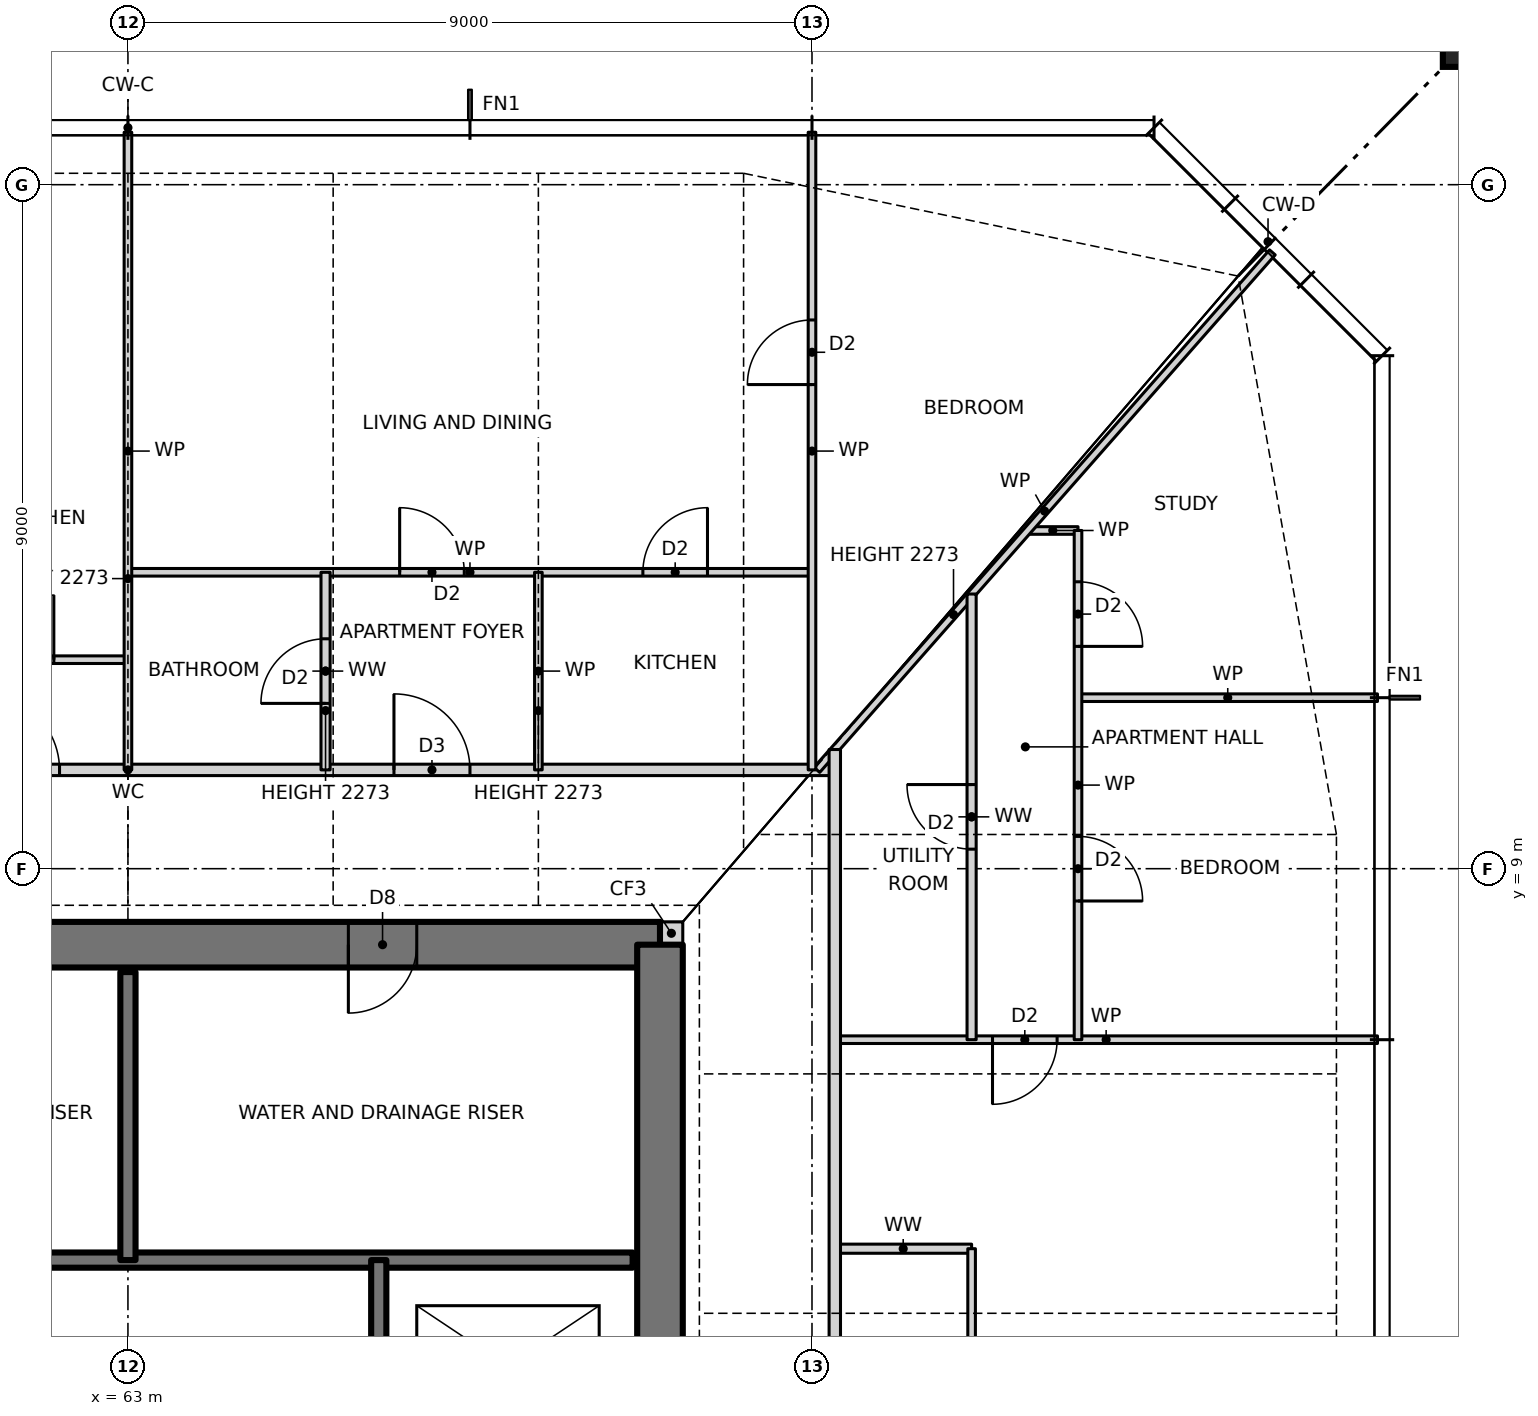
"""IFC4 building model, lengths in metres.
Left out: names, types, materials, properties, quantities, classifications, styles, units other than length and angle.
Written with IfcOpenShell. Run it as: python <this file> out.ifc"""

import sys

from ifc_helpers import new_model, si_unit, direction, frame, frame_2d, origin, origin_2d, place, context, subcontext, project, spatial, rectangle, hollow_rectangle, extrude, element, fill, save


model = new_model("IFC4")
c1 = context("Model", 3, precision=1e-05, world=origin(), true_north=direction((0.0, 1.0)))
c2 = subcontext(c1, "Body", "Model", "MODEL_VIEW")
j1 = project(units=[si_unit("LENGTHUNIT", "METRE"), si_unit("PLANEANGLEUNIT", "RADIAN")], contexts=[c1])
p1 = place(None, origin())
s1 = spatial("IfcSite", under=j1, at=p1, CompositionType="ELEMENT")
p2 = place(p1, origin())
s2 = spatial("IfcBuilding", under=s1, at=p2, CompositionType="ELEMENT")
p3 = place(p2, frame((0.0, 0.0, 71.0)))
s3 = spatial("IfcBuildingStorey", under=s2, at=p3, CompositionType="ELEMENT", Elevation=71.0)
p4 = place(p3, frame((80.9, 20.15, 0.0), z_axis=(0.0, 0.0, 1.0), x_axis=(1.0, 0.0, 0.0)))
e1 = element("IfcColumn", 1, at=p4, inside=s3, PredefinedType="COLUMN", context=c2, shape_type="SweptSolid", body=[
    extrude(hollow_rectangle(XDim=1.2, YDim=1.2, WallThickness=0.07, at=origin_2d()), origin(), (0.0, 0.0, 1.0), 3.5),
])
p5 = place(p3, frame((70.0, 8.15, 0.0), z_axis=(0.0, 0.0, 1.0), x_axis=(1.0, 0.0, 0.0)))
e2 = element("IfcWall", 2, at=p5, inside=s3, PredefinedType="SOLIDWALL", context=c2, shape_type="SweptSolid", body=[
    extrude(rectangle(XDim=0.3, YDim=0.3, at=frame_2d((0.15, 0.0))), origin(), (0.0, 0.0, 1.0), 3.5),
])
p6 = place(p3, frame((70.0, 8.0, 0.0), z_axis=(0.0, 0.0, 1.0), x_axis=(-1.0, 0.0, 0.0)))
e3 = element("IfcWall", 3, at=p6, inside=s3, PredefinedType="SHEAR", context=c2, shape_type="SweptSolid", body=[
    extrude(rectangle(XDim=14.0, YDim=0.6, at=frame_2d((7.0, 0.0))), origin(), (0.0, 0.0, 1.0), 3.5),
])
p7 = place(p6, frame((8.2, 0.0, 0.0)))
e4 = element("IfcOpeningElement", 4, at=p7, cuts=e3, PredefinedType="OPENING", context=c2, shape_type="SweptSolid", body=[
    extrude(rectangle(XDim=0.9, YDim=2.1, at=frame_2d((0.45, 1.05))), frame((0.0, 0.31, 0.0), z_axis=(0.0, -1.0, 0.0), x_axis=(1.0, 0.0, 0.0)), (0.0, 0.0, 1.0), 0.62),
])
p8 = place(p6, frame((3.2, 0.0, 0.0)))
e5 = element("IfcOpeningElement", 5, at=p8, cuts=e3, PredefinedType="OPENING", context=c2, shape_type="SweptSolid", body=[
    extrude(rectangle(XDim=0.9, YDim=2.1, at=frame_2d((0.45, 1.05))), frame((0.0, 0.31, 0.0), z_axis=(0.0, -1.0, 0.0), x_axis=(1.0, 0.0, 0.0)), (0.0, 0.0, 1.0), 0.62),
])
p9 = place(p3, frame((70.0, -8.0, 0.0), z_axis=(0.0, 0.0, 1.0), x_axis=(0.0, 1.0, 0.0)))
e6 = element("IfcWall", 6, at=p9, inside=s3, PredefinedType="SHEAR", context=c2, shape_type="SweptSolid", body=[
    extrude(rectangle(XDim=16.0, YDim=0.6, at=frame_2d((8.0, 0.0))), origin(), (0.0, 0.0, 1.0), 3.5),
])
p10 = place(p9, frame((7.5, 0.0, 0.0)))
e7 = element("IfcOpeningElement", 7, at=p10, cuts=e6, PredefinedType="OPENING", context=c2, shape_type="SweptSolid", body=[
    extrude(rectangle(XDim=1.0, YDim=2.1, at=frame_2d((0.5, 1.05))), frame((0.0, 0.31, 0.0), z_axis=(0.0, -1.0, 0.0), x_axis=(1.0, 0.0, 0.0)), (0.0, 0.0, 1.0), 0.62),
])
p11 = place(p3, frame((59.7, 3.85, 0.0), z_axis=(0.0, 0.0, 1.0), x_axis=(1.0, 0.0, 0.0)))
e8 = element("IfcWall", 8, at=p11, inside=s3, PredefinedType="SOLIDWALL", context=c2, shape_type="SweptSolid", body=[
    extrude(rectangle(XDim=9.94, YDim=0.2, at=frame_2d((4.97, 0.0))), origin(), (0.0, 0.0, 1.0), 3.5),
])
p12 = place(p3, frame((72.3, 4.0, 0.0), z_axis=(0.0, 0.0, 1.0), x_axis=(1.0, 0.0, 0.0)))
e9 = element("IfcWall", 9, at=p12, inside=s3, PredefinedType="PARTITIONING", context=c2, shape_type="SweptSolid", body=[
    extrude(rectangle(XDim=1.8, YDim=0.12, at=frame_2d((0.9, 0.0))), origin(), (0.0, 0.0, 1.0), 3.2),
])
p13 = place(p3, frame((72.3, 6.75, 0.0), z_axis=(0.0, 0.0, 1.0), x_axis=(1.0, 0.0, 0.0)))
e10 = element("IfcWall", 10, at=p13, inside=s3, PredefinedType="PARTITIONING", context=c2, shape_type="SweptSolid", body=[
    extrude(rectangle(XDim=7.14, YDim=0.1, at=frame_2d((3.57, 0.0))), origin(), (0.0, 0.0, 1.0), 3.2),
])
p14 = place(p13, frame((2.075, 0.0, 0.0)))
e11 = element("IfcOpeningElement", 11, at=p14, cuts=e10, PredefinedType="OPENING", context=c2, shape_type="SweptSolid", body=[
    extrude(rectangle(XDim=0.85, YDim=2.1, at=frame_2d((0.425, 1.05))), frame((0.0, 0.06, 0.0), z_axis=(0.0, -1.0, 0.0), x_axis=(1.0, 0.0, 0.0)), (0.0, 0.0, 1.0), 0.12),
])
p15 = place(p3, frame((53.7, 10.3, 0.0), z_axis=(0.0, 0.0, 1.0), x_axis=(1.0, 0.0, 0.0)))
e12 = element("IfcWall", 12, at=p15, inside=s3, PredefinedType="PARTITIONING", context=c2, shape_type="SweptSolid", body=[
    extrude(rectangle(XDim=18.6, YDim=0.15, at=frame_2d((9.3, 0.0))), origin(), (0.0, 0.0, 1.0), 3.2),
])
p16 = place(p15, frame((12.8, 0.0, 0.0)))
e13 = element("IfcOpeningElement", 13, at=p16, cuts=e12, PredefinedType="OPENING", context=c2, shape_type="SweptSolid", body=[
    extrude(rectangle(XDim=1.0, YDim=2.1, at=frame_2d((0.5, 1.05))), frame((0.0, 0.085, 0.0), z_axis=(0.0, -1.0, 0.0), x_axis=(1.0, 0.0, 0.0)), (0.0, 0.0, 1.0), 0.17),
])
p17 = place(p15, frame((7.4, 0.0, 0.0)))
e14 = element("IfcOpeningElement", 14, at=p17, cuts=e12, PredefinedType="OPENING", context=c2, shape_type="SweptSolid", body=[
    extrude(rectangle(XDim=1.0, YDim=2.1, at=frame_2d((0.5, 1.05))), frame((0.0, 0.085, 0.0), z_axis=(0.0, -1.0, 0.0), x_axis=(1.0, 0.0, 0.0)), (0.0, 0.0, 1.0), 0.17),
])
p18 = place(p3, frame((75.5, 11.25, 0.0), z_axis=(0.0, 0.0, 1.0), x_axis=(1.0, 0.0, 0.0)))
e15 = element("IfcWall", 15, at=p18, inside=s3, PredefinedType="PARTITIONING", context=c2, shape_type="SweptSolid", body=[
    extrude(rectangle(XDim=3.94, YDim=0.1, at=frame_2d((1.97, 0.0))), origin(), (0.0, 0.0, 1.0), 3.2),
])
p19 = place(p3, frame((60.2, 11.75, 0.0), z_axis=(0.0, 0.0, 1.0), x_axis=(1.0, 0.0, 0.0)))
e16 = element("IfcWall", 16, at=p19, inside=s3, PredefinedType="PARTITIONING", context=c2, shape_type="SweptSolid", body=[
    extrude(rectangle(XDim=2.8, YDim=0.1, at=frame_2d((1.4, 0.0))), origin(), (0.0, 0.0, 1.0), 3.2),
])
p20 = place(p19, frame((0.975, 0.0, 0.0)))
e17 = element("IfcOpeningElement", 17, at=p20, cuts=e16, PredefinedType="OPENING", context=c2, shape_type="SweptSolid", body=[
    extrude(rectangle(XDim=0.85, YDim=2.1, at=frame_2d((0.425, 1.05))), frame((0.0, 0.06, 0.0), z_axis=(0.0, -1.0, 0.0), x_axis=(1.0, 0.0, 0.0)), (0.0, 0.0, 1.0), 0.12),
])
p21 = place(p3, frame((63.0, 12.9, 0.0), z_axis=(0.0, 0.0, 1.0), x_axis=(1.0, 0.0, 0.0)))
e18 = element("IfcWall", 18, at=p21, inside=s3, PredefinedType="PARTITIONING", context=c2, shape_type="SweptSolid", body=[
    extrude(rectangle(XDim=9.0, YDim=0.1, at=frame_2d((4.5, 0.0))), origin(), (0.0, 0.0, 1.0), 3.2),
])
p22 = place(p21, frame((6.775, 0.0, 0.0)))
e19 = element("IfcOpeningElement", 19, at=p22, cuts=e18, PredefinedType="OPENING", context=c2, shape_type="SweptSolid", body=[
    extrude(rectangle(XDim=0.85, YDim=2.1, at=frame_2d((0.425, 1.05))), frame((0.0, 0.06, 0.0), z_axis=(0.0, -1.0, 0.0), x_axis=(1.0, 0.0, 0.0)), (0.0, 0.0, 1.0), 0.12),
])
p23 = place(p21, frame((3.575, 0.0, 0.0)))
e20 = element("IfcOpeningElement", 20, at=p23, cuts=e18, PredefinedType="OPENING", context=c2, shape_type="SweptSolid", body=[
    extrude(rectangle(XDim=0.85, YDim=2.1, at=frame_2d((0.425, 1.05))), frame((0.0, 0.06, 0.0), z_axis=(0.0, -1.0, 0.0), x_axis=(1.0, 0.0, 0.0)), (0.0, 0.0, 1.0), 0.12),
])
p24 = place(p3, frame((74.836, 13.45, 0.0), z_axis=(0.0, 0.0, 1.0), x_axis=(1.0, 0.0, 0.0)))
e21 = element("IfcWall", 21, at=p24, inside=s3, PredefinedType="PARTITIONING", context=c2, shape_type="SweptSolid", body=[
    extrude(rectangle(XDim=0.664, YDim=0.1, at=frame_2d((0.332, 0.0))), origin(), (0.0, 0.0, 1.0), 3.2),
])
p25 = place(p3, frame((72.064, 10.3, 0.0), z_axis=(0.0, 0.0, 1.0), x_axis=(0.660700699661, 0.750649442461, 0.0)))
e22 = element("IfcWall", 22, at=p25, inside=s3, PredefinedType="PARTITIONING", context=c2, shape_type="SweptSolid", body=[
    extrude(rectangle(XDim=9.071, YDim=0.1, at=frame_2d((4.535, 0.0))), origin(), (0.0, 0.0, 1.0), 2.273),
])
p26 = place(p3, frame((75.5, 6.75, 0.0), z_axis=(0.0, 0.0, 1.0), x_axis=(0.0, 1.0, 0.0)))
e23 = element("IfcWall", 23, at=p26, inside=s3, PredefinedType="PARTITIONING", context=c2, shape_type="SweptSolid", body=[
    extrude(rectangle(XDim=6.7, YDim=0.1, at=frame_2d((3.35, 0.0))), origin(), (0.0, 0.0, 1.0), 3.2),
])
p27 = place(p26, frame((1.825, 0.0, 0.0)))
e24 = element("IfcOpeningElement", 24, at=p27, cuts=e23, PredefinedType="OPENING", context=c2, shape_type="SweptSolid", body=[
    extrude(rectangle(XDim=0.85, YDim=2.1, at=frame_2d((0.425, 1.05))), frame((0.0, 0.06, 0.0), z_axis=(0.0, -1.0, 0.0), x_axis=(1.0, 0.0, 0.0)), (0.0, 0.0, 1.0), 0.12),
])
p28 = place(p26, frame((5.175, 0.0, 0.0)))
e25 = element("IfcOpeningElement", 25, at=p28, cuts=e23, PredefinedType="OPENING", context=c2, shape_type="SweptSolid", body=[
    extrude(rectangle(XDim=0.85, YDim=2.1, at=frame_2d((0.425, 1.05))), frame((0.0, 0.06, 0.0), z_axis=(0.0, -1.0, 0.0), x_axis=(1.0, 0.0, 0.0)), (0.0, 0.0, 1.0), 0.12),
])
p29 = place(p3, frame((74.1, -5.0, 0.0), z_axis=(0.0, 0.0, 1.0), x_axis=(0.0, 1.0, 0.0)))
e26 = element("IfcWall", 26, at=p29, inside=s3, PredefinedType="PARTITIONING", context=c2, shape_type="SweptSolid", body=[
    extrude(rectangle(XDim=9.0, YDim=0.1, at=frame_2d((4.5, 0.0))), origin(), (0.0, 0.0, 1.0), 3.2),
])
p30 = place(p29, frame((1.375, 0.0, 0.0)))
e27 = element("IfcOpeningElement", 27, at=p30, cuts=e26, PredefinedType="OPENING", context=c2, shape_type="SweptSolid", body=[
    extrude(rectangle(XDim=0.85, YDim=2.1, at=frame_2d((0.425, 1.05))), frame((0.0, 0.06, 0.0), z_axis=(0.0, -1.0, 0.0), x_axis=(1.0, 0.0, 0.0)), (0.0, 0.0, 1.0), 0.12),
])
p31 = place(p29, frame((4.575, 0.0, 0.0)))
e28 = element("IfcOpeningElement", 28, at=p31, cuts=e26, PredefinedType="OPENING", context=c2, shape_type="SweptSolid", body=[
    extrude(rectangle(XDim=0.85, YDim=2.1, at=frame_2d((0.425, 1.05))), frame((0.0, 0.06, 0.0), z_axis=(0.0, -1.0, 0.0), x_axis=(1.0, 0.0, 0.0)), (0.0, 0.0, 1.0), 0.12),
])
p32 = place(p3, frame((74.1, 6.75, 0.0), z_axis=(0.0, 0.0, 1.0), x_axis=(0.0, 1.0, 0.0)))
e29 = element("IfcWall", 29, at=p32, inside=s3, PredefinedType="PARTITIONING", context=c2, shape_type="SweptSolid", body=[
    extrude(rectangle(XDim=5.864, YDim=0.12, at=frame_2d((2.932, 0.0))), origin(), (0.0, 0.0, 1.0), 3.2),
])
p33 = place(p32, frame((2.507, 0.0, 0.0)))
e30 = element("IfcOpeningElement", 30, at=p33, cuts=e29, PredefinedType="OPENING", context=c2, shape_type="SweptSolid", body=[
    extrude(rectangle(XDim=0.85, YDim=2.1, at=frame_2d((0.425, 1.05))), frame((0.0, 0.07, 0.0), z_axis=(0.0, -1.0, 0.0), x_axis=(1.0, 0.0, 0.0)), (0.0, 0.0, 1.0), 0.14),
])
p34 = place(p3, frame((72.3, -10.568, 0.0), z_axis=(0.0, 0.0, 1.0), x_axis=(0.0, 1.0, 0.0)))
e31 = element("IfcWall", 31, at=p34, inside=s3, PredefinedType="PARTITIONING", context=c2, shape_type="SweptSolid", body=[
    extrude(rectangle(XDim=21.136, YDim=0.15, at=frame_2d((10.568, 0.0))), origin(), (0.0, 0.0, 1.0), 3.2),
])
p35 = place(p34, frame((10.068, 0.0, 0.0)))
e32 = element("IfcOpeningElement", 32, at=p35, cuts=e31, PredefinedType="OPENING", context=c2, shape_type="SweptSolid", body=[
    extrude(rectangle(XDim=1.0, YDim=2.1, at=frame_2d((0.5, 1.05))), frame((0.0, 0.085, 0.0), z_axis=(0.0, -1.0, 0.0), x_axis=(1.0, 0.0, 0.0)), (0.0, 0.0, 1.0), 0.17),
])
p36 = place(p3, frame((72.0, 10.3, 0.0), z_axis=(0.0, 0.0, 1.0), x_axis=(0.0, 1.0, 0.0)))
e33 = element("IfcWall", 33, at=p36, inside=s3, PredefinedType="PARTITIONING", context=c2, shape_type="SweptSolid", body=[
    extrude(rectangle(XDim=8.39, YDim=0.1, at=frame_2d((4.195, 0.0))), origin(), (0.0, 0.0, 1.0), 3.2),
])
p37 = place(p36, frame((5.07, 0.0, 0.0)))
e34 = element("IfcOpeningElement", 34, at=p37, cuts=e33, PredefinedType="OPENING", context=c2, shape_type="SweptSolid", body=[
    extrude(rectangle(XDim=0.85, YDim=2.1, at=frame_2d((0.425, 1.05))), frame((0.0, 0.06, 0.0), z_axis=(0.0, -1.0, 0.0), x_axis=(1.0, 0.0, 0.0)), (0.0, 0.0, 1.0), 0.12),
])
p38 = place(p3, frame((68.4, 10.3, 0.0), z_axis=(0.0, 0.0, 1.0), x_axis=(0.0, 1.0, 0.0)))
e35 = element("IfcWall", 35, at=p38, inside=s3, PredefinedType="PARTITIONING", context=c2, shape_type="SweptSolid", body=[
    extrude(rectangle(XDim=2.6, YDim=0.1, at=frame_2d((1.3, 0.0))), origin(), (0.0, 0.0, 1.0), 2.273),
])
p39 = place(p3, frame((66.3, -7.64, 0.0), z_axis=(0.0, 0.0, 1.0), x_axis=(0.0, 1.0, 0.0)))
e36 = element("IfcWall", 36, at=p39, inside=s3, PredefinedType="SOLIDWALL", context=c2, shape_type="SweptSolid", body=[
    extrude(rectangle(XDim=11.49, YDim=0.2, at=frame_2d((5.745, 0.0))), origin(), (0.0, 0.0, 1.0), 3.5),
])
p40 = place(p39, frame((7.04, 0.0, 0.0)))
e37 = element("IfcOpeningElement", 37, at=p40, cuts=e36, PredefinedType="OPENING", context=c2, shape_type="SweptSolid", body=[
    extrude(rectangle(XDim=1.2, YDim=2.1, at=frame_2d((0.6, 1.05))), frame((0.0, 0.11, 0.0), z_axis=(0.0, -1.0, 0.0), x_axis=(1.0, 0.0, 0.0)), (0.0, 0.0, 1.0), 0.22),
])
p41 = place(p3, frame((65.6, 10.3, 0.0), z_axis=(0.0, 0.0, 1.0), x_axis=(0.0, 1.0, 0.0)))
e38 = element("IfcWall", 38, at=p41, inside=s3, PredefinedType="PARTITIONING", context=c2, shape_type="SweptSolid", body=[
    extrude(rectangle(XDim=2.6, YDim=0.12, at=frame_2d((1.3, 0.0))), origin(), (0.0, 0.0, 1.0), 2.273),
])
p42 = place(p41, frame((0.875, 0.0, 0.0)))
e39 = element("IfcOpeningElement", 39, at=p42, cuts=e38, PredefinedType="OPENING", context=c2, shape_type="SweptSolid", body=[
    extrude(rectangle(XDim=0.85, YDim=2.1, at=frame_2d((0.425, 1.05))), frame((0.0, 0.07, 0.0), z_axis=(0.0, -1.0, 0.0), x_axis=(1.0, 0.0, 0.0)), (0.0, 0.0, 1.0), 0.14),
])
p43 = place(p3, frame((63.0, 3.85, 0.0), z_axis=(0.0, 0.0, 1.0), x_axis=(0.0, 1.0, 0.0)))
e40 = element("IfcWall", 40, at=p43, inside=s3, PredefinedType="SOLIDWALL", context=c2, shape_type="SweptSolid", body=[
    extrude(rectangle(XDim=3.79, YDim=0.2, at=frame_2d((1.895, 0.0))), origin(), (0.0, 0.0, 1.0), 3.5),
])
p44 = place(p3, frame((63.0, 10.3, 0.0), z_axis=(0.0, 0.0, 1.0), x_axis=(0.0, 1.0, 0.0)))
e41 = element("IfcWall", 41, at=p44, inside=s3, PredefinedType="PARTITIONING", context=c2, shape_type="SweptSolid", body=[
    extrude(rectangle(XDim=8.39, YDim=0.1, at=frame_2d((4.195, 0.0))), origin(), (0.0, 0.0, 1.0), 2.273),
])
p45 = place(p14, frame((0.85, 0.0, 0.0), z_axis=(0.0, 0.0, 1.0), x_axis=(-1.0, 0.0, 0.0)))
e42 = element("IfcDoor", 42, at=p45, inside=s3, OperationType="SINGLE_SWING_RIGHT", PredefinedType="DOOR", context=c2, shape_type="SweptSolid", body=[
    extrude(rectangle(XDim=0.85, YDim=2.1, at=frame_2d((0.425, 1.05))), frame((0.0, 0.025, 0.0), z_axis=(0.0, -1.0, 0.0), x_axis=(1.0, 0.0, 0.0)), (0.0, 0.0, 1.0), 0.05),
])
fill(e11, e42)
p46 = place(p27, frame((0.85, 0.0, 0.0), z_axis=(0.0, 0.0, 1.0), x_axis=(-1.0, 0.0, 0.0)))
e43 = element("IfcDoor", 43, at=p46, inside=s3, OperationType="SINGLE_SWING_RIGHT", PredefinedType="DOOR", context=c2, shape_type="SweptSolid", body=[
    extrude(rectangle(XDim=0.85, YDim=2.1, at=frame_2d((0.425, 1.05))), frame((0.0, 0.025, 0.0), z_axis=(0.0, -1.0, 0.0), x_axis=(1.0, 0.0, 0.0)), (0.0, 0.0, 1.0), 0.05),
])
fill(e24, e43)
p47 = place(p28, frame((0.85, 0.0, 0.0), z_axis=(0.0, 0.0, 1.0), x_axis=(-1.0, 0.0, 0.0)))
e44 = element("IfcDoor", 44, at=p47, inside=s3, OperationType="SINGLE_SWING_RIGHT", PredefinedType="DOOR", context=c2, shape_type="SweptSolid", body=[
    extrude(rectangle(XDim=0.85, YDim=2.1, at=frame_2d((0.425, 1.05))), frame((0.0, 0.025, 0.0), z_axis=(0.0, -1.0, 0.0), x_axis=(1.0, 0.0, 0.0)), (0.0, 0.0, 1.0), 0.05),
])
fill(e25, e44)
p48 = place(p33, origin())
e45 = element("IfcDoor", 45, at=p48, inside=s3, OperationType="SINGLE_SWING_RIGHT", PredefinedType="DOOR", context=c2, shape_type="SweptSolid", body=[
    extrude(rectangle(XDim=0.85, YDim=2.1, at=frame_2d((0.425, 1.05))), frame((0.0, 0.025, 0.0), z_axis=(0.0, -1.0, 0.0), x_axis=(1.0, 0.0, 0.0)), (0.0, 0.0, 1.0), 0.05),
])
fill(e30, e45)
p49 = place(p22, origin())
e46 = element("IfcDoor", 46, at=p49, inside=s3, OperationType="SINGLE_SWING_RIGHT", PredefinedType="DOOR", context=c2, shape_type="SweptSolid", body=[
    extrude(rectangle(XDim=0.85, YDim=2.1, at=frame_2d((0.425, 1.05))), frame((0.0, 0.025, 0.0), z_axis=(0.0, -1.0, 0.0), x_axis=(1.0, 0.0, 0.0)), (0.0, 0.0, 1.0), 0.05),
])
fill(e19, e46)
p50 = place(p16, origin())
e47 = element("IfcDoor", 47, at=p50, inside=s3, OperationType="SINGLE_SWING_LEFT", PredefinedType="DOOR", context=c2, shape_type="SweptSolid", body=[
    extrude(rectangle(XDim=1.0, YDim=2.1, at=frame_2d((0.5, 1.05))), frame((0.0, 0.025, 0.0), z_axis=(0.0, -1.0, 0.0), x_axis=(1.0, 0.0, 0.0)), (0.0, 0.0, 1.0), 0.05),
])
fill(e13, e47)
p51 = place(p23, origin())
e48 = element("IfcDoor", 48, at=p51, inside=s3, OperationType="SINGLE_SWING_LEFT", PredefinedType="DOOR", context=c2, shape_type="SweptSolid", body=[
    extrude(rectangle(XDim=0.85, YDim=2.1, at=frame_2d((0.425, 1.05))), frame((0.0, 0.025, 0.0), z_axis=(0.0, -1.0, 0.0), x_axis=(1.0, 0.0, 0.0)), (0.0, 0.0, 1.0), 0.05),
])
fill(e20, e48)
p52 = place(p42, origin())
e49 = element("IfcDoor", 49, at=p52, inside=s3, OperationType="SINGLE_SWING_LEFT", PredefinedType="DOOR", context=c2, shape_type="SweptSolid", body=[
    extrude(rectangle(XDim=0.85, YDim=2.1, at=frame_2d((0.425, 1.05))), frame((0.0, 0.025, 0.0), z_axis=(0.0, -1.0, 0.0), x_axis=(1.0, 0.0, 0.0)), (0.0, 0.0, 1.0), 0.05),
])
fill(e39, e49)
p53 = place(p37, origin())
e50 = element("IfcDoor", 50, at=p53, inside=s3, OperationType="SINGLE_SWING_LEFT", PredefinedType="DOOR", context=c2, shape_type="SweptSolid", body=[
    extrude(rectangle(XDim=0.85, YDim=2.1, at=frame_2d((0.425, 1.05))), frame((0.0, 0.025, 0.0), z_axis=(0.0, -1.0, 0.0), x_axis=(1.0, 0.0, 0.0)), (0.0, 0.0, 1.0), 0.05),
])
fill(e34, e50)
p54 = place(p17, origin())
e51 = element("IfcDoor", 51, at=p54, inside=s3, OperationType="SINGLE_SWING_LEFT", PredefinedType="DOOR", context=c2, shape_type="SweptSolid", body=[
    extrude(rectangle(XDim=1.0, YDim=2.1, at=frame_2d((0.5, 1.05))), frame((0.0, 0.025, 0.0), z_axis=(0.0, -1.0, 0.0), x_axis=(1.0, 0.0, 0.0)), (0.0, 0.0, 1.0), 0.05),
])
fill(e14, e51)
p55 = place(p20, origin())
e52 = element("IfcDoor", 52, at=p55, inside=s3, OperationType="SINGLE_SWING_RIGHT", PredefinedType="DOOR", context=c2, shape_type="SweptSolid", body=[
    extrude(rectangle(XDim=0.85, YDim=2.1, at=frame_2d((0.425, 1.05))), frame((0.0, 0.025, 0.0), z_axis=(0.0, -1.0, 0.0), x_axis=(1.0, 0.0, 0.0)), (0.0, 0.0, 1.0), 0.05),
])
fill(e17, e52)
p56 = place(p8, origin())
e53 = element("IfcDoor", 53, at=p56, inside=s3, OperationType="SINGLE_SWING_RIGHT", PredefinedType="DOOR", context=c2, shape_type="SweptSolid", body=[
    extrude(rectangle(XDim=0.9, YDim=2.1, at=frame_2d((0.45, 1.05))), frame((0.0, 0.025, 0.0), z_axis=(0.0, -1.0, 0.0), x_axis=(1.0, 0.0, 0.0)), (0.0, 0.0, 1.0), 0.05),
])
fill(e5, e53)
save(model, sys.argv[1])
